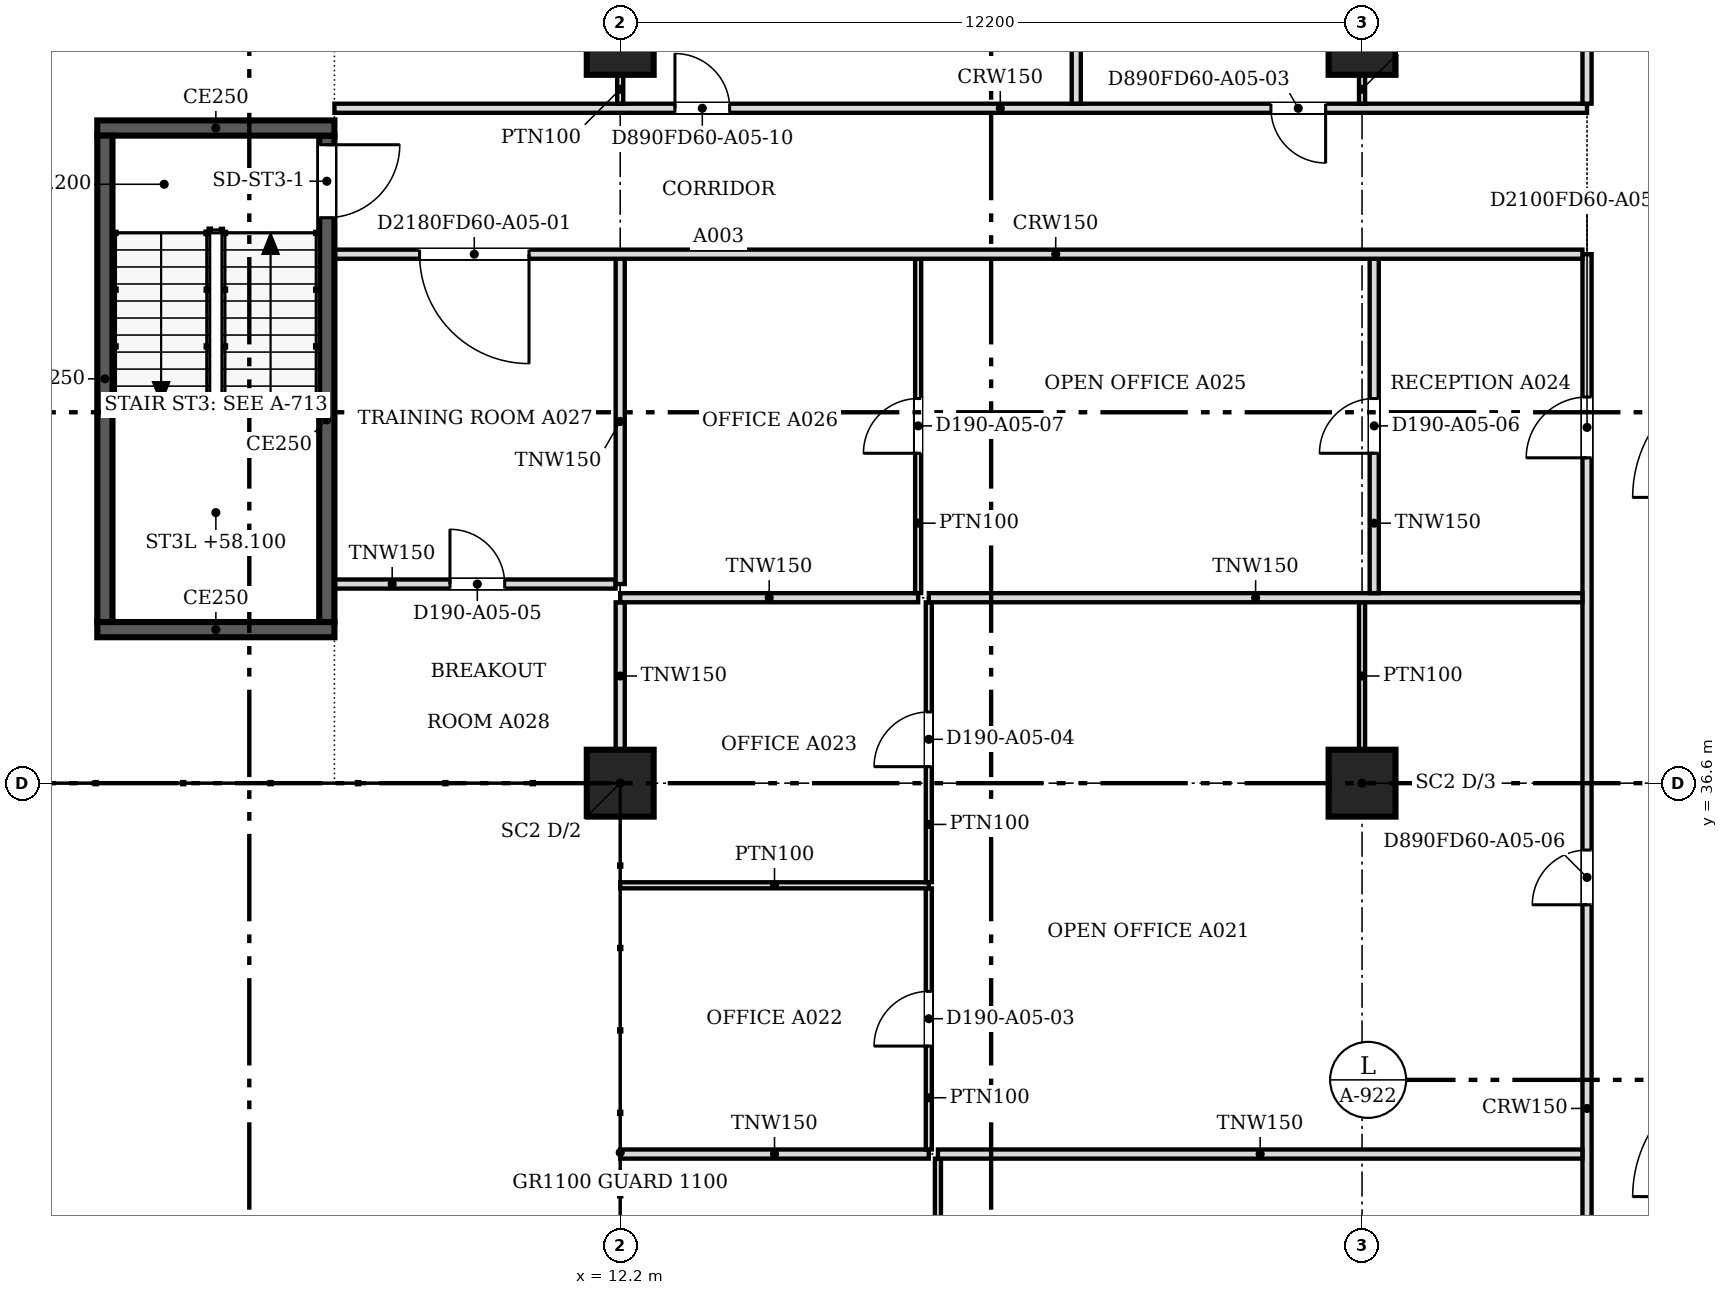
"""IFC4 building model, lengths in metres.
Left out: names, types, materials, properties, quantities, classifications, styles, units other than length and angle.
Written with IfcOpenShell. Run it as: python <this file> out.ifc"""

import sys

from ifc_helpers import new_model, si_unit, direction, frame, frame_2d, origin, origin_2d, place, context, subcontext, project, spatial, rectangle, extrude, source, transform, mapped, element, fill, save


model = new_model("IFC4")
c1 = context("Model", 3, precision=1e-05, world=origin(), true_north=direction((0.0, 1.0)))
c2 = subcontext(c1, "Body", "Model", "MODEL_VIEW")
j1 = project(units=[si_unit("LENGTHUNIT", "METRE"), si_unit("PLANEANGLEUNIT", "RADIAN")], contexts=[c1])
p1 = place(None, origin())
s1 = spatial("IfcSite", under=j1, at=p1, CompositionType="ELEMENT")
p2 = place(p1, origin())
s2 = spatial("IfcBuilding", under=s1, at=p2, CompositionType="ELEMENT")
p3 = place(p2, frame((0.0, 0.0, 56.2)))
s3 = spatial("IfcBuildingStorey", under=s2, at=p3, CompositionType="ELEMENT", Elevation=56.2)
for number, where, z_axis, x_axis in (
    (1, (12.2, 36.6, 0.0), (0.0, 0.0, 1.0), (1.0, 0.0, 0.0)),
    (2, (12.2, 48.8, 0.0), (0.0, 0.0, 1.0), (1.0, 0.0, 0.0)),
    (3, (24.4, 36.6, 0.0), (0.0, 0.0, 1.0), (1.0, 0.0, 0.0)),
    (4, (24.4, 48.8, 0.0), (0.0, 0.0, 1.0), (1.0, 0.0, 0.0)),
):
    element("IfcColumn", number, at=place(p3, frame(where, z_axis=z_axis, x_axis=x_axis)), inside=s3, PredefinedType="COLUMN", context=c2, shape_type="SweptSolid", body=[
        extrude(rectangle(XDim=1.1, YDim=1.1, at=origin_2d()), origin(), (0.0, 0.0, 1.0), 3.6),
    ])
p4 = place(p3, frame((7.5, 39.125, 0.0), z_axis=(0.0, 0.0, 1.0), x_axis=(-1.0, 0.0, 0.0)))
e5 = element("IfcWall", 5, at=p4, inside=s3, PredefinedType="SOLIDWALL", context=c2, shape_type="SweptSolid", body=[
    extrude(rectangle(XDim=3.9, YDim=0.25, at=frame_2d((1.95, 0.0))), origin(), (0.0, 0.0, 1.0), 3.8),
])
p5 = place(p3, frame((3.725, 39.25, 0.0), z_axis=(0.0, 0.0, 1.0), x_axis=(0.0, 1.0, 0.0)))
e6 = element("IfcWall", 6, at=p5, inside=s3, PredefinedType="SOLIDWALL", context=c2, shape_type="SweptSolid", body=[
    extrude(rectangle(XDim=8.0, YDim=0.25, at=frame_2d((4.0, 0.0))), origin(), (0.0, 0.0, 1.0), 3.8),
])
p6 = place(p3, frame((3.6, 47.375, 0.0), z_axis=(0.0, 0.0, 1.0), x_axis=(1.0, 0.0, 0.0)))
e7 = element("IfcWall", 7, at=p6, inside=s3, PredefinedType="SOLIDWALL", context=c2, shape_type="SweptSolid", body=[
    extrude(rectangle(XDim=3.9, YDim=0.25, at=frame_2d((1.95, 0.0))), origin(), (0.0, 0.0, 1.0), 3.8),
])
p7 = place(p3, frame((7.375, 47.25, 0.0), z_axis=(0.0, 0.0, 1.0), x_axis=(0.0, -1.0, 0.0)))
e8 = element("IfcWall", 8, at=p7, inside=s3, PredefinedType="SOLIDWALL", context=c2, shape_type="SweptSolid", body=[
    extrude(rectangle(XDim=8.0, YDim=0.25, at=frame_2d((4.0, 0.0))), origin(), (0.0, 0.0, 1.0), 3.8),
])
m1 = source(origin(), c2, "Body", "SweptSolid", [
    extrude(rectangle(XDim=1.2, YDim=2.1, at=frame_2d((0.6, 1.05))), frame((0.0, 0.135, 0.0), z_axis=(0.0, -1.0, 0.0), x_axis=(1.0, 0.0, 0.0)), (0.0, 0.0, 1.0), 0.27),
])
p8 = place(p7, frame((0.15, 0.0, 0.0)))
e9 = element("IfcOpeningElement", 9, at=p8, cuts=e8, PredefinedType="OPENING", context=c2, shape_type="MappedRepresentation", body=[
    mapped(m1, transform((0.0, 0.0, 0.0), scale=1.0)),
])
p9 = place(p3, frame((28.1, 18.8, 0.0), z_axis=(0.0, 0.0, 1.0), x_axis=(0.0, 1.0, 0.0)))
e10 = element("IfcWall", 10, at=p9, inside=s3, PredefinedType="PARTITIONING", context=c2, shape_type="SweptSolid", body=[
    extrude(rectangle(XDim=26.5, YDim=0.15, at=frame_2d((13.25, 0.0))), origin(), (0.0, 0.0, 1.0), 3.067),
])
m2 = source(origin(), c2, "Body", "SweptSolid", [
    extrude(rectangle(XDim=0.9, YDim=2.1, at=frame_2d((0.45, 1.05))), frame((0.0, 0.085, 0.0), z_axis=(0.0, -1.0, 0.0), x_axis=(1.0, 0.0, 0.0)), (0.0, 0.0, 1.0), 0.17),
])
p10 = place(p9, frame((1.1, 0.0, 0.0)))
e11 = element("IfcOpeningElement", 11, at=p10, cuts=e10, PredefinedType="OPENING", context=c2, shape_type="MappedRepresentation", body=[
    mapped(m2, transform((0.0, 0.0, 0.0), scale=1.0)),
])
m3 = source(origin(), c2, "Body", "SweptSolid", [
    extrude(rectangle(XDim=1.0, YDim=2.1, at=frame_2d((0.5, 1.05))), frame((0.0, 0.085, 0.0), z_axis=(0.0, -1.0, 0.0), x_axis=(1.0, 0.0, 0.0)), (0.0, 0.0, 1.0), 0.17),
])
p11 = place(p9, frame((23.151, 0.0, 0.0)))
e12 = element("IfcOpeningElement", 12, at=p11, cuts=e10, PredefinedType="OPENING", context=c2, shape_type="MappedRepresentation", body=[
    mapped(m3, transform((0.0, 0.0, 0.0), scale=1.0)),
])
p12 = place(p9, frame((8.2, 0.0, 0.0)))
e13 = element("IfcOpeningElement", 13, at=p12, cuts=e10, PredefinedType="OPENING", context=c2, shape_type="MappedRepresentation", body=[
    mapped(m2, transform((0.0, 0.0, 0.0), scale=1.0)),
])
p13 = place(p9, frame((15.8, 0.0, 0.0)))
e14 = element("IfcOpeningElement", 14, at=p13, cuts=e10, PredefinedType="OPENING", context=c2, shape_type="MappedRepresentation", body=[
    mapped(m2, transform((0.0, 0.0, 0.0), scale=1.0)),
])
p14 = place(p3, frame((17.425, 24.476, 0.0), z_axis=(0.0, 0.0, 1.0), x_axis=(0.0, 1.0, 0.0)))
e15 = element("IfcWall", 15, at=p14, inside=s3, PredefinedType="PARTITIONING", context=c2, shape_type="SweptSolid", body=[
    extrude(rectangle(XDim=5.948, YDim=0.1, at=frame_2d((2.974, 0.0))), origin(), (0.0, 0.0, 1.0), 3.067),
])
m4 = source(origin(), c2, "Body", "SweptSolid", [
    extrude(rectangle(XDim=0.9, YDim=2.1, at=frame_2d((0.45, 1.05))), frame((0.0, 0.06, 0.0), z_axis=(0.0, -1.0, 0.0), x_axis=(1.0, 0.0, 0.0)), (0.0, 0.0, 1.0), 0.12),
])
p15 = place(p14, frame((2.5, 0.0, 0.0)))
e16 = element("IfcOpeningElement", 16, at=p15, cuts=e15, PredefinedType="OPENING", context=c2, shape_type="MappedRepresentation", body=[
    mapped(m4, transform((0.0, 0.0, 0.0), scale=1.0)),
])
p16 = place(p3, frame((12.2, 30.5, 0.0), z_axis=(0.0, 0.0, 1.0), x_axis=(1.0, 0.0, 0.0)))
e17 = element("IfcWall", 17, at=p16, inside=s3, PredefinedType="PARTITIONING", context=c2, shape_type="SweptSolid", body=[
    extrude(rectangle(XDim=5.075, YDim=0.15, at=frame_2d((2.538, 0.0))), origin(), (0.0, 0.0, 1.0), 3.067),
])
p17 = place(p3, frame((17.425, 30.5, 0.0), z_axis=(0.0, 0.0, 1.0), x_axis=(1.0, 0.0, 0.0)))
e18 = element("IfcWall", 18, at=p17, inside=s3, PredefinedType="PARTITIONING", context=c2, shape_type="SweptSolid", body=[
    extrude(rectangle(XDim=10.599, YDim=0.15, at=frame_2d((5.299, 0.0))), origin(), (0.0, 0.0, 1.0), 3.067),
])
p18 = place(p3, frame((17.275, 30.576, 0.0), z_axis=(0.0, 0.0, 1.0), x_axis=(0.0, 1.0, 0.0)))
e19 = element("IfcWall", 19, at=p18, inside=s3, PredefinedType="PARTITIONING", context=c2, shape_type="SweptSolid", body=[
    extrude(rectangle(XDim=4.293, YDim=0.1, at=frame_2d((2.147, 0.0))), origin(), (0.0, 0.0, 1.0), 3.067),
])
p19 = place(p18, frame((1.7, 0.0, 0.0)))
e20 = element("IfcOpeningElement", 20, at=p19, cuts=e19, PredefinedType="OPENING", context=c2, shape_type="MappedRepresentation", body=[
    mapped(m4, transform((0.0, 0.0, 0.0), scale=1.0)),
])
p20 = place(p3, frame((12.2, 34.92, 0.0), z_axis=(0.0, 0.0, 1.0), x_axis=(1.0, 0.0, 0.0)))
e21 = element("IfcWall", 21, at=p20, inside=s3, PredefinedType="PARTITIONING", context=c2, shape_type="SweptSolid", body=[
    extrude(rectangle(XDim=5.075, YDim=0.1, at=frame_2d((2.538, 0.0))), origin(), (0.0, 0.0, 1.0), 3.067),
])
p21 = place(p3, frame((17.275, 34.971, 0.0), z_axis=(0.0, 0.0, 1.0), x_axis=(0.0, 1.0, 0.0)))
e22 = element("IfcWall", 22, at=p21, inside=s3, PredefinedType="PARTITIONING", context=c2, shape_type="SweptSolid", body=[
    extrude(rectangle(XDim=4.603, YDim=0.1, at=frame_2d((2.301, 0.0))), origin(), (0.0, 0.0, 1.0), 3.067),
])
p22 = place(p21, frame((1.9, 0.0, 0.0)))
e23 = element("IfcOpeningElement", 23, at=p22, cuts=e22, PredefinedType="OPENING", context=c2, shape_type="MappedRepresentation", body=[
    mapped(m4, transform((0.0, 0.0, 0.0), scale=1.0)),
])
p23 = place(p3, frame((12.2, 37.151, 0.0), z_axis=(0.0, 0.0, 1.0), x_axis=(0.0, 1.0, 0.0)))
e24 = element("IfcWall", 24, at=p23, inside=s3, PredefinedType="PARTITIONING", context=c2, shape_type="SweptSolid", body=[
    extrude(rectangle(XDim=2.423, YDim=0.15, at=frame_2d((1.211, 0.0))), origin(), (0.0, 0.0, 1.0), 3.067),
])
p24 = place(p3, frame((24.4, 37.15, 0.0), z_axis=(0.0, 0.0, 1.0), x_axis=(0.0, 1.0, 0.0)))
e25 = element("IfcWall", 25, at=p24, inside=s3, PredefinedType="PARTITIONING", context=c2, shape_type="SweptSolid", body=[
    extrude(rectangle(XDim=2.425, YDim=0.1, at=frame_2d((1.212, 0.0))), origin(), (0.0, 0.0, 1.0), 3.067),
])
p25 = place(p3, frame((12.2, 39.65, 0.0), z_axis=(0.0, 0.0, 1.0), x_axis=(1.0, 0.0, 0.0)))
e26 = element("IfcWall", 26, at=p25, inside=s3, PredefinedType="PARTITIONING", context=c2, shape_type="SweptSolid", body=[
    extrude(rectangle(XDim=4.9, YDim=0.15, at=frame_2d((2.45, 0.0))), origin(), (0.0, 0.0, 1.0), 3.067),
])
p26 = place(p3, frame((17.275, 39.65, 0.0), z_axis=(0.0, 0.0, 1.0), x_axis=(1.0, 0.0, 0.0)))
e27 = element("IfcWall", 27, at=p26, inside=s3, PredefinedType="PARTITIONING", context=c2, shape_type="SweptSolid", body=[
    extrude(rectangle(XDim=10.749, YDim=0.15, at=frame_2d((5.375, 0.0))), origin(), (0.0, 0.0, 1.0), 3.067),
])
p27 = place(p3, frame((17.1, 39.726, 0.0), z_axis=(0.0, 0.0, 1.0), x_axis=(0.0, 1.0, 0.0)))
e28 = element("IfcWall", 28, at=p27, inside=s3, PredefinedType="PARTITIONING", context=c2, shape_type="SweptSolid", body=[
    extrude(rectangle(XDim=5.498, YDim=0.1, at=frame_2d((2.749, 0.0))), origin(), (0.0, 0.0, 1.0), 3.067),
])
p28 = place(p27, frame((2.3, 0.0, 0.0)))
e29 = element("IfcOpeningElement", 29, at=p28, cuts=e28, PredefinedType="OPENING", context=c2, shape_type="MappedRepresentation", body=[
    mapped(m4, transform((0.0, 0.0, 0.0), scale=1.0)),
])
p29 = place(p3, frame((24.6, 39.726, 0.0), z_axis=(0.0, 0.0, 1.0), x_axis=(0.0, 1.0, 0.0)))
e30 = element("IfcWall", 30, at=p29, inside=s3, PredefinedType="PARTITIONING", context=c2, shape_type="SweptSolid", body=[
    extrude(rectangle(XDim=5.498, YDim=0.15, at=frame_2d((2.749, 0.0))), origin(), (0.0, 0.0, 1.0), 3.067),
])
p30 = place(p29, frame((2.3, 0.0, 0.0)))
e31 = element("IfcOpeningElement", 31, at=p30, cuts=e30, PredefinedType="OPENING", context=c2, shape_type="MappedRepresentation", body=[
    mapped(m2, transform((0.0, 0.0, 0.0), scale=1.0)),
])
p31 = place(p3, frame((12.124, 39.875, 0.0), z_axis=(0.0, 0.0, 1.0), x_axis=(-1.0, 0.0, 0.0)))
e32 = element("IfcWall", 32, at=p31, inside=s3, PredefinedType="PARTITIONING", context=c2, shape_type="SweptSolid", body=[
    extrude(rectangle(XDim=4.624, YDim=0.15, at=frame_2d((2.312, 0.0))), origin(), (0.0, 0.0, 1.0), 3.067),
])
p32 = place(p31, frame((1.824, 0.0, 0.0)))
e33 = element("IfcOpeningElement", 33, at=p32, cuts=e32, PredefinedType="OPENING", context=c2, shape_type="MappedRepresentation", body=[
    mapped(m2, transform((0.0, 0.0, 0.0), scale=1.0)),
])
p33 = place(p3, frame((12.2, 39.875, 0.0), z_axis=(0.0, 0.0, 1.0), x_axis=(0.0, 1.0, 0.0)))
e34 = element("IfcWall", 34, at=p33, inside=s3, PredefinedType="PARTITIONING", context=c2, shape_type="SweptSolid", body=[
    extrude(rectangle(XDim=5.349, YDim=0.15, at=frame_2d((2.675, 0.0))), origin(), (0.0, 0.0, 1.0), 3.067),
])
p34 = place(p3, frame((28.024, 45.3, 0.0), z_axis=(0.0, 0.0, 1.0), x_axis=(-1.0, 0.0, 0.0)))
e35 = element("IfcWall", 35, at=p34, inside=s3, PredefinedType="PARTITIONING", context=c2, shape_type="SweptSolid", body=[
    extrude(rectangle(XDim=20.524, YDim=0.15, at=frame_2d((10.262, 0.0))), origin(), (0.0, 0.0, 1.0), 3.067),
])
m5 = source(origin(), c2, "Body", "SweptSolid", [
    extrude(rectangle(XDim=1.8, YDim=2.1, at=frame_2d((0.9, 1.05))), frame((0.0, 0.085, 0.0), z_axis=(0.0, -1.0, 0.0), x_axis=(1.0, 0.0, 0.0)), (0.0, 0.0, 1.0), 0.17),
])
p35 = place(p34, frame((17.324, 0.0, 0.0)))
e36 = element("IfcOpeningElement", 36, at=p35, cuts=e35, PredefinedType="OPENING", context=c2, shape_type="MappedRepresentation", body=[
    mapped(m5, transform((0.0, 0.0, 0.0), scale=1.0)),
])
p36 = place(p3, frame((7.5, 47.7, 0.0), z_axis=(0.0, 0.0, 1.0), x_axis=(1.0, 0.0, 0.0)))
e37 = element("IfcWall", 37, at=p36, inside=s3, PredefinedType="PARTITIONING", context=c2, shape_type="SweptSolid", body=[
    extrude(rectangle(XDim=20.6, YDim=0.15, at=frame_2d((10.3, 0.0))), origin(), (0.0, 0.0, 1.0), 3.067),
])
p37 = place(p36, frame((15.401, 0.0, 0.0)))
e38 = element("IfcOpeningElement", 38, at=p37, cuts=e37, PredefinedType="OPENING", context=c2, shape_type="MappedRepresentation", body=[
    mapped(m2, transform((0.0, 0.0, 0.0), scale=1.0)),
])
p38 = place(p36, frame((5.6, 0.0, 0.0)))
e39 = element("IfcOpeningElement", 39, at=p38, cuts=e37, PredefinedType="OPENING", context=c2, shape_type="MappedRepresentation", body=[
    mapped(m2, transform((0.0, 0.0, 0.0), scale=1.0)),
])
p39 = place(p3, frame((19.7, 47.776, 0.0), z_axis=(0.0, 0.0, 1.0), x_axis=(0.0, 1.0, 0.0)))
e40 = element("IfcWall", 40, at=p39, inside=s3, PredefinedType="PARTITIONING", context=c2, shape_type="SweptSolid", body=[
    extrude(rectangle(XDim=6.624, YDim=0.15, at=frame_2d((3.312, 0.0))), origin(), (0.0, 0.0, 1.0), 3.067),
])
p40 = place(p3, frame((28.1, 47.776, 0.0), z_axis=(0.0, 0.0, 1.0), x_axis=(0.0, 1.0, 0.0)))
e41 = element("IfcWall", 41, at=p40, inside=s3, PredefinedType="PARTITIONING", context=c2, shape_type="SweptSolid", body=[
    extrude(rectangle(XDim=3.324, YDim=0.15, at=frame_2d((1.662, 0.0))), origin(), (0.0, 0.0, 1.0), 3.067),
])
for number, where, z_axis, x_axis in (
    (42, (12.2, 48.25, 0.0), (0.0, 0.0, 1.0), (0.0, -1.0, 0.0)),
    (43, (24.4, 48.25, 0.0), (0.0, 0.0, 1.0), (0.0, -1.0, 0.0)),
):
    element("IfcWall", number, at=place(p3, frame(where, z_axis=z_axis, x_axis=x_axis)), inside=s3, PredefinedType="PARTITIONING", context=c2, shape_type="SweptSolid", body=[
        extrude(rectangle(XDim=0.475, YDim=0.1, at=frame_2d((0.238, 0.0))), origin(), (0.0, 0.0, 1.0), 3.067),
    ])
m6 = source(origin(), c2, "Body", "SweptSolid", [
    extrude(rectangle(XDim=1.2, YDim=2.1, at=frame_2d((0.6, 1.05))), frame((0.0, 0.025, 0.0), z_axis=(0.0, -1.0, 0.0), x_axis=(1.0, 0.0, 0.0)), (0.0, 0.0, 1.0), 0.05),
])
p41 = place(p8, origin())
e44 = element("IfcDoor", 44, at=p41, inside=s3, OperationType="SINGLE_SWING_LEFT", PredefinedType="DOOR", context=c2, shape_type="MappedRepresentation", body=[
    mapped(m6, transform((0.0, 0.0, 0.0), scale=1.0)),
])
fill(e9, e44)
m7 = source(origin(), c2, "Body", "SweptSolid", [
    extrude(rectangle(XDim=0.9, YDim=2.1, at=frame_2d((0.45, 1.05))), frame((0.0, 0.025, 0.0), z_axis=(0.0, -1.0, 0.0), x_axis=(1.0, 0.0, 0.0)), (0.0, 0.0, 1.0), 0.05),
])
p42 = place(p19, origin())
e45 = element("IfcDoor", 45, at=p42, inside=s3, OperationType="SINGLE_SWING_LEFT", PredefinedType="DOOR", context=c2, shape_type="MappedRepresentation", body=[
    mapped(m7, transform((0.0, 0.0, 0.0), scale=1.0)),
])
fill(e20, e45)
p43 = place(p22, origin())
e46 = element("IfcDoor", 46, at=p43, inside=s3, OperationType="SINGLE_SWING_LEFT", PredefinedType="DOOR", context=c2, shape_type="MappedRepresentation", body=[
    mapped(m7, transform((0.0, 0.0, 0.0), scale=1.0)),
])
fill(e23, e46)
p44 = place(p32, origin())
e47 = element("IfcDoor", 47, at=p44, inside=s3, OperationType="SINGLE_SWING_RIGHT", PredefinedType="DOOR", context=c2, shape_type="MappedRepresentation", body=[
    mapped(m7, transform((0.0, 0.0, 0.0), scale=1.0)),
])
fill(e33, e47)
m8 = source(origin(), c2, "Body", "SweptSolid", [
    extrude(rectangle(XDim=1.8, YDim=2.1, at=frame_2d((0.9, 1.05))), frame((0.0, 0.025, 0.0), z_axis=(0.0, -1.0, 0.0), x_axis=(1.0, 0.0, 0.0)), (0.0, 0.0, 1.0), 0.05),
])
p45 = place(p35, origin())
e48 = element("IfcDoor", 48, at=p45, inside=s3, OperationType="DOUBLE_DOOR_SINGLE_SWING", PredefinedType="DOOR", context=c2, shape_type="MappedRepresentation", body=[
    mapped(m8, transform((0.0, 0.0, 0.0), scale=1.0)),
])
fill(e36, e48)
p46 = place(p30, origin())
e49 = element("IfcDoor", 49, at=p46, inside=s3, OperationType="SINGLE_SWING_LEFT", PredefinedType="DOOR", context=c2, shape_type="MappedRepresentation", body=[
    mapped(m7, transform((0.0, 0.0, 0.0), scale=1.0)),
])
fill(e31, e49)
p47 = place(p28, origin())
e50 = element("IfcDoor", 50, at=p47, inside=s3, OperationType="SINGLE_SWING_LEFT", PredefinedType="DOOR", context=c2, shape_type="MappedRepresentation", body=[
    mapped(m7, transform((0.0, 0.0, 0.0), scale=1.0)),
])
fill(e29, e50)
m9 = source(origin(), c2, "Body", "SweptSolid", [
    extrude(rectangle(XDim=1.0, YDim=2.1, at=frame_2d((0.5, 1.05))), frame((0.0, 0.025, 0.0), z_axis=(0.0, -1.0, 0.0), x_axis=(1.0, 0.0, 0.0)), (0.0, 0.0, 1.0), 0.05),
])
p48 = place(p11, origin())
e51 = element("IfcDoor", 51, at=p48, inside=s3, OperationType="SINGLE_SWING_LEFT", PredefinedType="DOOR", context=c2, shape_type="MappedRepresentation", body=[
    mapped(m9, transform((0.0, 0.0, 0.0), scale=1.0)),
])
fill(e12, e51)
p49 = place(p37, origin())
e52 = element("IfcDoor", 52, at=p49, inside=s3, OperationType="SINGLE_SWING_RIGHT", PredefinedType="DOOR", context=c2, shape_type="MappedRepresentation", body=[
    mapped(m7, transform((0.0, 0.0, 0.0), scale=1.0)),
])
fill(e38, e52)
p50 = place(p13, origin())
e53 = element("IfcDoor", 53, at=p50, inside=s3, OperationType="SINGLE_SWING_LEFT", PredefinedType="DOOR", context=c2, shape_type="MappedRepresentation", body=[
    mapped(m7, transform((0.0, 0.0, 0.0), scale=1.0)),
])
fill(e14, e53)
p51 = place(p38, origin())
e54 = element("IfcDoor", 54, at=p51, inside=s3, OperationType="SINGLE_SWING_LEFT", PredefinedType="DOOR", context=c2, shape_type="MappedRepresentation", body=[
    mapped(m7, transform((0.0, 0.0, 0.0), scale=1.0)),
])
fill(e39, e54)
save(model, sys.argv[1])
